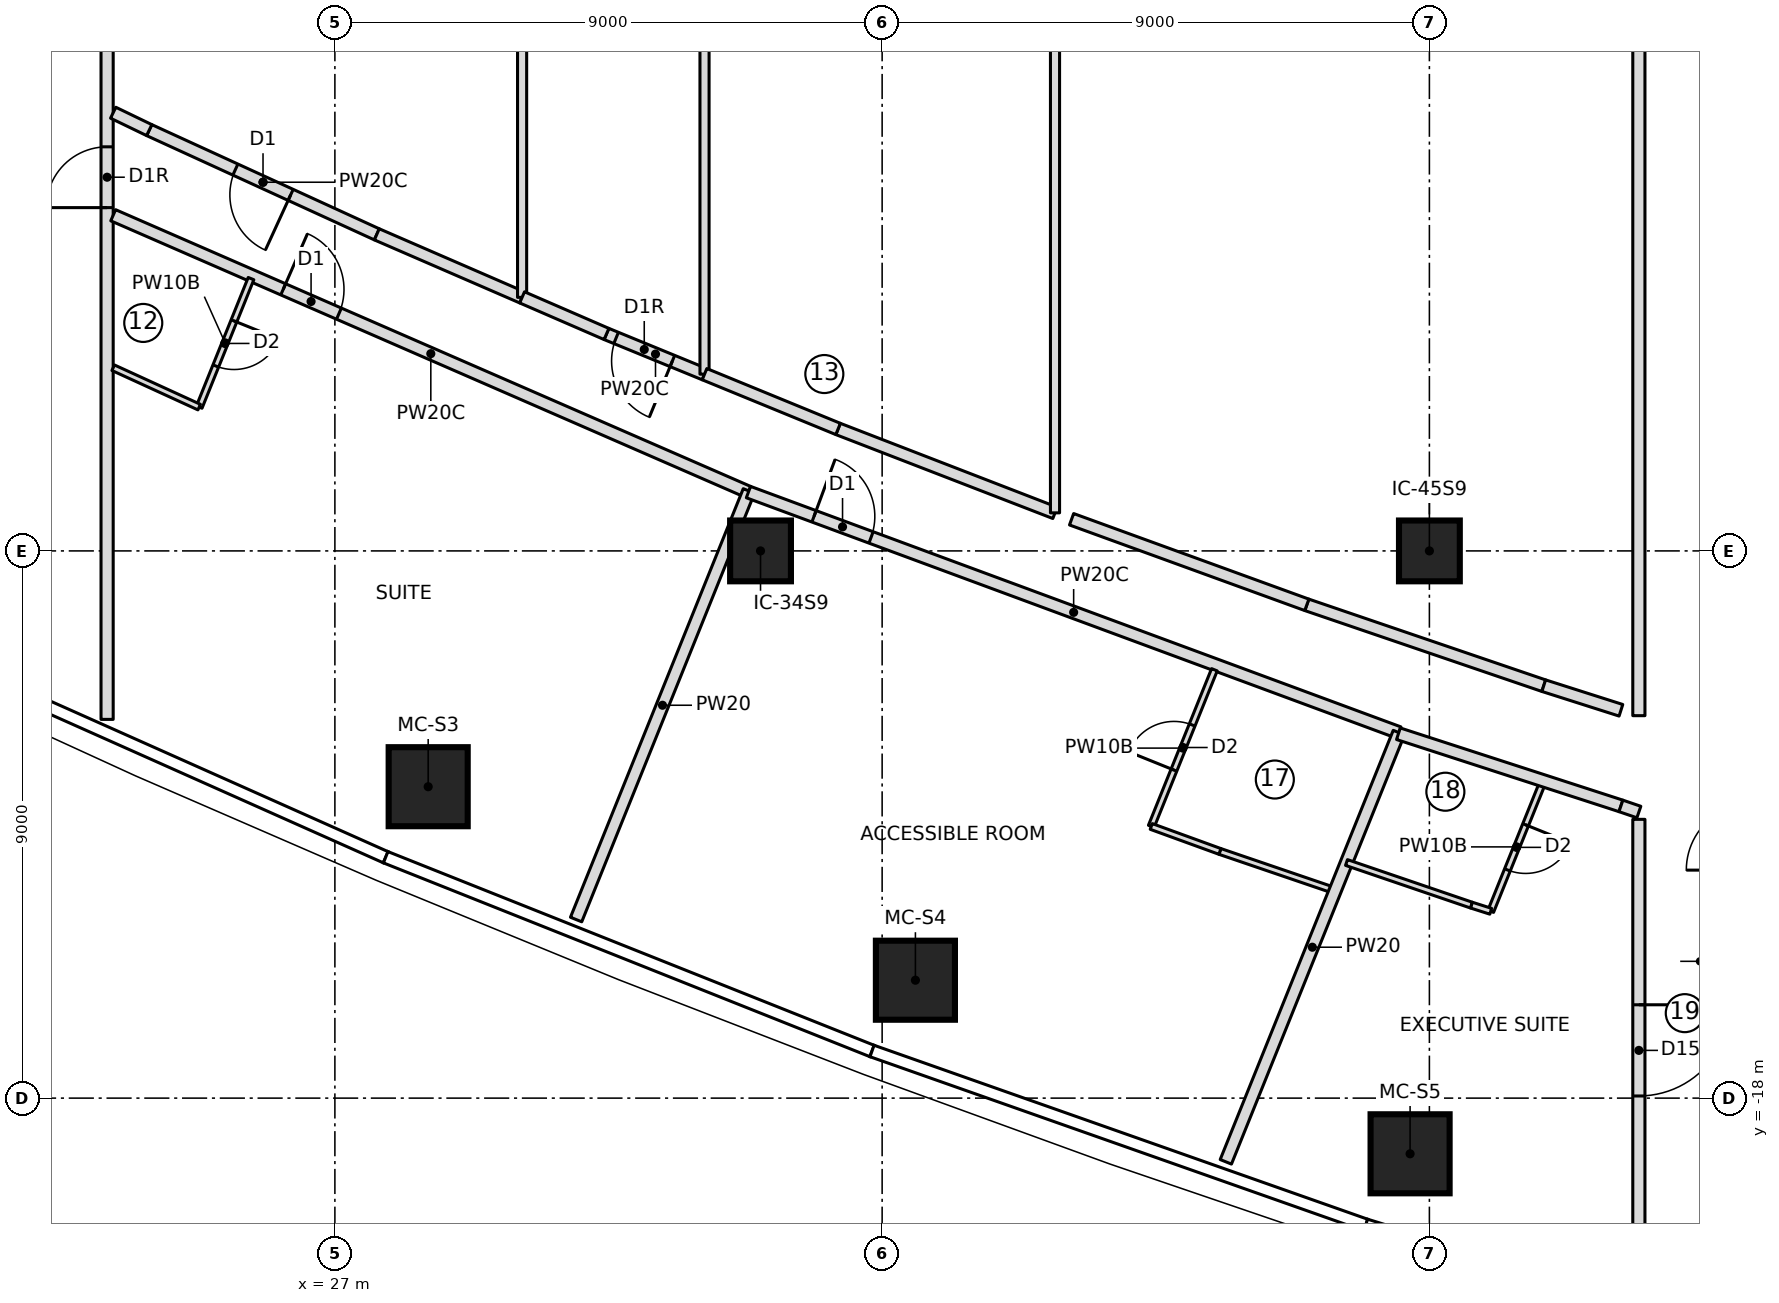
"""IFC4 building model, lengths in metres.
Left out: names, types, materials, properties, quantities, classifications, styles, units other than length and angle.
Written with IfcOpenShell. Run it as: python <this file> out.ifc"""

import sys

from ifc_helpers import new_model, si_unit, direction, frame, frame_2d, origin, origin_2d, place, context, subcontext, project, spatial, rectangle, extrude, element, fill, save


model = new_model("IFC4")
c1 = context("Model", 3, precision=1e-05, world=origin(), true_north=direction((0.0, 1.0)))
c2 = subcontext(c1, "Body", "Model", "MODEL_VIEW")
j1 = project(units=[si_unit("LENGTHUNIT", "METRE"), si_unit("PLANEANGLEUNIT", "RADIAN")], contexts=[c1])
p1 = place(None, origin())
s1 = spatial("IfcSite", under=j1, at=p1, CompositionType="ELEMENT")
p2 = place(p1, origin())
s2 = spatial("IfcBuilding", under=s1, at=p2, CompositionType="ELEMENT")
p3 = place(p2, frame((0.0, 0.0, 189.7)))
s3 = spatial("IfcBuildingStorey", under=s2, at=p3, CompositionType="ELEMENT", Elevation=189.7)
for number, where, z_axis, x_axis in (
    (1, (28.534, -12.878, 0.0), (0.0, 0.0, 1.0), (1.0, 0.0, 0.0)),
    (2, (36.547, -16.061, 0.0), (0.0, 0.0, 1.0), (1.0, 0.0, 0.0)),
    (3, (44.683, -18.916, 0.0), (0.0, 0.0, 1.0), (1.0, 0.0, 0.0)),
):
    element("IfcColumn", number, at=place(p3, frame(where, z_axis=z_axis, x_axis=x_axis)), inside=s3, PredefinedType="COLUMN", context=c2, shape_type="SweptSolid", body=[
        extrude(rectangle(XDim=1.3, YDim=1.3, at=origin_2d()), origin(), (0.0, 0.0, 1.0), 3.55),
    ])
for number, where, z_axis, x_axis in (
    (4, (34.0, -9.0, 0.0), (0.0, 0.0, 1.0), (1.0, 0.0, 0.0)),
    (5, (45.0, -9.0, 0.0), (0.0, 0.0, 1.0), (1.0, 0.0, 0.0)),
):
    element("IfcColumn", number, at=place(p3, frame(where, z_axis=z_axis, x_axis=x_axis)), inside=s3, PredefinedType="COLUMN", context=c2, shape_type="SweptSolid", body=[
        extrude(rectangle(XDim=1.0, YDim=1.0, at=origin_2d()), origin(), (0.0, 0.0, 1.0), 3.55),
    ])
p4 = place(p3, frame((23.254, -11.771, 0.0), z_axis=(0.0, 0.0, 1.0), x_axis=(0.0, 1.0, 0.0)))
e6 = element("IfcWall", 6, at=p4, inside=s3, PredefinedType="PARTITIONING", context=c2, shape_type="SweptSolid", body=[
    extrude(rectangle(XDim=23.542, YDim=0.2, at=frame_2d((11.771, 0.0))), origin(), (0.0, 0.0, 1.0), 3.25),
])
p5 = place(p4, frame((14.125, 0.0, 0.0)))
e7 = element("IfcOpeningElement", 7, at=p5, cuts=e6, PredefinedType="OPENING", context=c2, shape_type="SweptSolid", body=[
    extrude(rectangle(XDim=1.0, YDim=2.1, at=frame_2d((0.5, 1.05))), frame((0.0, 0.11, 0.0), z_axis=(0.0, -1.0, 0.0), x_axis=(1.0, 0.0, 0.0)), (0.0, 0.0, 1.0), 0.22),
])
p6 = place(p4, frame((8.417, 0.0, 0.0)))
e8 = element("IfcOpeningElement", 8, at=p6, cuts=e6, PredefinedType="OPENING", context=c2, shape_type="SweptSolid", body=[
    extrude(rectangle(XDim=1.0, YDim=2.1, at=frame_2d((0.5, 1.05))), frame((0.0, 0.11, 0.0), z_axis=(0.0, -1.0, 0.0), x_axis=(1.0, 0.0, 0.0)), (0.0, 0.0, 1.0), 0.22),
])
p7 = place(p3, frame((23.354, -3.479, 0.0), z_axis=(0.0, 0.0, 1.0), x_axis=(0.916726746983, -0.399514794926, 0.0)))
e9 = element("IfcWall", 9, at=p7, inside=s3, PredefinedType="PARTITIONING", context=c2, shape_type="SweptSolid", body=[
    extrude(rectangle(XDim=11.396, YDim=0.2, at=frame_2d((5.698, 0.0))), origin(), (0.0, 0.0, 1.0), 3.25),
])
p8 = place(p7, frame((3.05, 0.0, 0.0)))
e10 = element("IfcOpeningElement", 10, at=p8, cuts=e9, PredefinedType="OPENING", context=c2, shape_type="SweptSolid", body=[
    extrude(rectangle(XDim=1.0, YDim=2.1, at=frame_2d((0.5, 1.05))), frame((0.0, 0.11, 0.0), z_axis=(0.0, -1.0, 0.0), x_axis=(1.0, 0.0, 0.0)), (0.0, 0.0, 1.0), 0.22),
])
p9 = place(p3, frame((25.621, -4.521, 0.0), z_axis=(0.0, 0.0, 1.0), x_axis=(-0.373956446544, -0.927446265877, 0.0)))
e11 = element("IfcWall", 11, at=p9, inside=s3, PredefinedType="PARTITIONING", context=c2, shape_type="SweptSolid", body=[
    extrude(rectangle(XDim=2.279, YDim=0.1, at=frame_2d((1.14, 0.0))), origin(), (0.0, 0.0, 1.0), 3.25),
])
p10 = place(p9, frame((0.75, 0.0, 0.0)))
e12 = element("IfcOpeningElement", 12, at=p10, cuts=e11, PredefinedType="OPENING", context=c2, shape_type="SweptSolid", body=[
    extrude(rectangle(XDim=0.8, YDim=2.1, at=frame_2d((0.4, 1.05))), frame((0.0, 0.06, 0.0), z_axis=(0.0, -1.0, 0.0), x_axis=(1.0, 0.0, 0.0)), (0.0, 0.0, 1.0), 0.12),
])
p11 = place(p3, frame((24.769, -6.635, 0.0), z_axis=(0.0, 0.0, 1.0), x_axis=(-0.909158902999, 0.416449383597, 0.0)))
e13 = element("IfcWall", 13, at=p11, inside=s3, PredefinedType="PARTITIONING", context=c2, shape_type="SweptSolid", body=[
    extrude(rectangle(XDim=1.556, YDim=0.1, at=frame_2d((0.778, 0.0))), origin(), (0.0, 0.0, 1.0), 3.25),
])
p12 = place(p3, frame((30.967, -15.063, 0.0), z_axis=(0.0, 0.0, 1.0), x_axis=(0.373887223455, 0.927474174378, 0.0)))
e14 = element("IfcWall", 14, at=p12, inside=s3, PredefinedType="PARTITIONING", context=c2, shape_type="SweptSolid", body=[
    extrude(rectangle(XDim=7.6, YDim=0.2, at=frame_2d((3.8, 0.0))), origin(), (0.0, 0.0, 1.0), 3.25),
])
p13 = place(p3, frame((33.801, -8.032, 0.0), z_axis=(0.0, 0.0, 1.0), x_axis=(0.937916242759, -0.346861819127, 0.0)))
e15 = element("IfcWall", 15, at=p13, inside=s3, PredefinedType="PARTITIONING", context=c2, shape_type="SweptSolid", body=[
    extrude(rectangle(XDim=11.405, YDim=0.2, at=frame_2d((5.702, 0.0))), origin(), (0.0, 0.0, 1.0), 3.25),
])
p14 = place(p13, frame((1.15, 0.0, 0.0)))
e16 = element("IfcOpeningElement", 16, at=p14, cuts=e15, PredefinedType="OPENING", context=c2, shape_type="SweptSolid", body=[
    extrude(rectangle(XDim=1.0, YDim=2.1, at=frame_2d((0.5, 1.05))), frame((0.0, 0.11, 0.0), z_axis=(0.0, -1.0, 0.0), x_axis=(1.0, 0.0, 0.0)), (0.0, 0.0, 1.0), 0.22),
])
p15 = place(p3, frame((40.426, -13.532, 0.0), z_axis=(0.0, 0.0, 1.0), x_axis=(0.373889095325, 0.927473419779, 0.0)))
e17 = element("IfcWall", 17, at=p15, inside=s3, PredefinedType="PARTITIONING", context=c2, shape_type="SweptSolid", body=[
    extrude(rectangle(XDim=2.778, YDim=0.1, at=frame_2d((1.389, 0.0))), origin(), (0.0, 0.0, 1.0), 3.25),
])
p16 = place(p15, frame((1.0, 0.0, 0.0)))
e18 = element("IfcOpeningElement", 18, at=p16, cuts=e17, PredefinedType="OPENING", context=c2, shape_type="SweptSolid", body=[
    extrude(rectangle(XDim=0.8, YDim=2.1, at=frame_2d((0.4, 1.05))), frame((0.0, 0.06, 0.0), z_axis=(0.0, -1.0, 0.0), x_axis=(1.0, 0.0, 0.0)), (0.0, 0.0, 1.0), 0.12),
])
p17 = place(p3, frame((43.449, -14.589, 0.0), z_axis=(0.0, 0.0, 1.0), x_axis=(-0.94641533286, 0.322952036265, 0.0)))
e19 = element("IfcWall", 19, at=p17, inside=s3, PredefinedType="PARTITIONING", context=c2, shape_type="SweptSolid", body=[
    extrude(rectangle(XDim=2.002, YDim=0.1, at=frame_2d((1.001, 0.0))), origin(), (0.0, 0.0, 1.0), 3.25),
])
p18 = place(p3, frame((41.555, -13.943, 0.0), z_axis=(0.0, 0.0, 1.0), x_axis=(-0.939781557461, 0.341775692897, 0.0)))
e20 = element("IfcWall", 20, at=p18, inside=s3, PredefinedType="PARTITIONING", context=c2, shape_type="SweptSolid", body=[
    extrude(rectangle(XDim=1.201, YDim=0.1, at=frame_2d((0.601, 0.0))), origin(), (0.0, 0.0, 1.0), 3.25),
])
p19 = place(p3, frame((41.652, -19.048, 0.0), z_axis=(0.0, 0.0, 1.0), x_axis=(0.373877998371, 0.927477893178, 0.0)))
e21 = element("IfcWall", 21, at=p19, inside=s3, PredefinedType="PARTITIONING", context=c2, shape_type="SweptSolid", body=[
    extrude(rectangle(XDim=7.611, YDim=0.2, at=frame_2d((3.806, 0.0))), origin(), (0.0, 0.0, 1.0), 3.25),
])
p20 = place(p3, frame((46.863, -12.809, 0.0), z_axis=(0.0, 0.0, 1.0), x_axis=(-0.373877855241, -0.927477950876, 0.0)))
e22 = element("IfcWall", 22, at=p20, inside=s3, PredefinedType="PARTITIONING", context=c2, shape_type="SweptSolid", body=[
    extrude(rectangle(XDim=2.283, YDim=0.1, at=frame_2d((1.142, 0.0))), origin(), (0.0, 0.0, 1.0), 3.25),
])
p21 = place(p20, frame((0.75, 0.0, 0.0)))
e23 = element("IfcOpeningElement", 23, at=p21, cuts=e22, PredefinedType="OPENING", context=c2, shape_type="SweptSolid", body=[
    extrude(rectangle(XDim=0.8, YDim=2.1, at=frame_2d((0.4, 1.05))), frame((0.0, 0.06, 0.0), z_axis=(0.0, -1.0, 0.0), x_axis=(1.0, 0.0, 0.0)), (0.0, 0.0, 1.0), 0.12),
])
p22 = place(p3, frame((46.009, -14.927, 0.0), z_axis=(0.0, 0.0, 1.0), x_axis=(-0.952618746207, 0.304166935045, 0.0)))
e24 = element("IfcWall", 24, at=p22, inside=s3, PredefinedType="PARTITIONING", context=c2, shape_type="SweptSolid", body=[
    extrude(rectangle(XDim=0.335, YDim=0.1, at=frame_2d((0.167, 0.0))), origin(), (0.0, 0.0, 1.0), 3.25),
])
p23 = place(p3, frame((45.69, -14.825, 0.0), z_axis=(0.0, 0.0, 1.0), x_axis=(-0.946442988685, 0.322870979136, 0.0)))
e25 = element("IfcWall", 25, at=p23, inside=s3, PredefinedType="PARTITIONING", context=c2, shape_type="SweptSolid", body=[
    extrude(rectangle(XDim=2.169, YDim=0.1, at=frame_2d((1.085, 0.0))), origin(), (0.0, 0.0, 1.0), 3.25),
])
p24 = place(p3, frame((27.69, -3.793, 0.0), z_axis=(0.0, 0.0, 1.0), x_axis=(-0.909180834404, 0.416401501382, 0.0)))
e26 = element("IfcWall", 26, at=p24, inside=s3, PredefinedType="PARTITIONING", context=c2, shape_type="SweptSolid", body=[
    extrude(rectangle(XDim=4.117, YDim=0.2, at=frame_2d((2.059, 0.0))), origin(), (0.0, 0.0, 1.0), 3.25),
])
p25 = place(p24, frame((1.559, 0.0, 0.0)))
e27 = element("IfcOpeningElement", 27, at=p25, cuts=e26, PredefinedType="OPENING", context=c2, shape_type="SweptSolid", body=[
    extrude(rectangle(XDim=1.0, YDim=2.1, at=frame_2d((0.5, 1.05))), frame((0.0, 0.11, 0.0), z_axis=(0.0, -1.0, 0.0), x_axis=(1.0, 0.0, 0.0)), (0.0, 0.0, 1.0), 0.22),
])
p26 = place(p3, frame((23.947, -2.079, 0.0), z_axis=(0.0, 0.0, 1.0), x_axis=(-0.900646803965, 0.434551877809, 0.0)))
e28 = element("IfcWall", 28, at=p26, inside=s3, PredefinedType="PARTITIONING", context=c2, shape_type="SweptSolid", body=[
    extrude(rectangle(XDim=0.658, YDim=0.2, at=frame_2d((0.329, 0.0))), origin(), (0.0, 0.0, 1.0), 3.25),
])
p27 = place(p3, frame((30.079, -4.83, 0.0), z_axis=(0.0, 0.0, 1.0), x_axis=(-0.917370846112, 0.398033579869, 0.0)))
e29 = element("IfcWall", 29, at=p27, inside=s3, PredefinedType="PARTITIONING", context=c2, shape_type="SweptSolid", body=[
    extrude(rectangle(XDim=2.604, YDim=0.2, at=frame_2d((1.302, 0.0))), origin(), (0.0, 0.0, 1.0), 3.25),
])
p28 = place(p3, frame((30.079, -4.83, 0.0), z_axis=(0.0, 0.0, 1.0), x_axis=(0.0, 1.0, 0.0)))
e30 = element("IfcWall", 30, at=p28, inside=s3, PredefinedType="PARTITIONING", context=c2, shape_type="SweptSolid", body=[
    extrude(rectangle(XDim=9.66, YDim=0.15, at=frame_2d((4.83, 0.0))), origin(), (0.0, 0.0, 1.0), 3.25),
])
p29 = place(p3, frame((33.079, -6.093, 0.0), z_axis=(0.0, 0.0, 1.0), x_axis=(-0.925234201035, 0.379396459177, 0.0)))
e31 = element("IfcWall", 31, at=p29, inside=s3, PredefinedType="PARTITIONING", context=c2, shape_type="SweptSolid", body=[
    extrude(rectangle(XDim=1.743, YDim=0.2, at=frame_2d((0.871, 0.0))), origin(), (0.0, 0.0, 1.0), 3.25),
])
p30 = place(p29, frame((0.571, 0.0, 0.0)))
e32 = element("IfcOpeningElement", 32, at=p30, cuts=e31, PredefinedType="OPENING", context=c2, shape_type="SweptSolid", body=[
    extrude(rectangle(XDim=1.0, YDim=2.1, at=frame_2d((0.5, 1.05))), frame((0.0, 0.11, 0.0), z_axis=(0.0, -1.0, 0.0), x_axis=(1.0, 0.0, 0.0)), (0.0, 0.0, 1.0), 0.22),
])
p31 = place(p3, frame((31.467, -5.432, 0.0), z_axis=(0.0, 0.0, 1.0), x_axis=(-0.917382817853, 0.398005986774, 0.0)))
e33 = element("IfcWall", 33, at=p31, inside=s3, PredefinedType="PARTITIONING", context=c2, shape_type="SweptSolid", body=[
    extrude(rectangle(XDim=1.513, YDim=0.2, at=frame_2d((0.756, 0.0))), origin(), (0.0, 0.0, 1.0), 3.25),
])
p32 = place(p3, frame((33.079, -6.093, 0.0), z_axis=(0.0, 0.0, 1.0), x_axis=(0.0, 1.0, 0.0)))
e34 = element("IfcWall", 34, at=p32, inside=s3, PredefinedType="PARTITIONING", context=c2, shape_type="SweptSolid", body=[
    extrude(rectangle(XDim=12.187, YDim=0.15, at=frame_2d((6.093, 0.0))), origin(), (0.0, 0.0, 1.0), 3.25),
])
p33 = place(p3, frame((38.843, -8.374, 0.0), z_axis=(0.0, 0.0, 1.0), x_axis=(-0.932681040007, 0.360702200731, 0.0)))
e35 = element("IfcWall", 35, at=p33, inside=s3, PredefinedType="PARTITIONING", context=c2, shape_type="SweptSolid", body=[
    extrude(rectangle(XDim=3.825, YDim=0.2, at=frame_2d((1.913, 0.0))), origin(), (0.0, 0.0, 1.0), 3.25),
])
p34 = place(p3, frame((35.276, -6.994, 0.0), z_axis=(0.0, 0.0, 1.0), x_axis=(-0.925186207522, 0.37951347988, 0.0)))
e36 = element("IfcWall", 36, at=p34, inside=s3, PredefinedType="PARTITIONING", context=c2, shape_type="SweptSolid", body=[
    extrude(rectangle(XDim=2.375, YDim=0.2, at=frame_2d((1.187, 0.0))), origin(), (0.0, 0.0, 1.0), 3.25),
])
p35 = place(p3, frame((38.843, -8.374, 0.0), z_axis=(0.0, 0.0, 1.0), x_axis=(0.0, 1.0, 0.0)))
e37 = element("IfcWall", 37, at=p35, inside=s3, PredefinedType="PARTITIONING", context=c2, shape_type="SweptSolid", body=[
    extrude(rectangle(XDim=16.748, YDim=0.15, at=frame_2d((8.374, 0.0))), origin(), (0.0, 0.0, 1.0), 3.25),
])
for number, where, z_axis, x_axis in (
    (38, (46.881, -11.217, 0.0), (0.0, 0.0, 1.0), (-0.946, 0.323, 0.0)),
    (39, (42.984, -9.887, 0.0), (0.0, 0.0, 1.0), (-0.94, 0.342, 0.0)),
):
    element("IfcWall", number, at=place(p3, frame(where, z_axis=z_axis, x_axis=x_axis)), inside=s3, PredefinedType="PARTITIONING", context=c2, shape_type="SweptSolid", body=[
        extrude(rectangle(XDim=4.117, YDim=0.2, at=frame_2d((2.059, 0.0))), origin(), (0.0, 0.0, 1.0), 3.25),
    ])
p36 = place(p3, frame((44.49, -12.007, 0.0), z_axis=(0.0, 0.0, 1.0), x_axis=(0.951228355446, -0.308487626648, 0.0)))
e40 = element("IfcWall", 40, at=p36, inside=s3, PredefinedType="PARTITIONING", context=c2, shape_type="SweptSolid", body=[
    extrude(rectangle(XDim=3.847, YDim=0.2, at=frame_2d((1.924, 0.0))), origin(), (0.0, 0.0, 1.0), 3.25),
])
p37 = place(p3, frame((48.15, -11.621, 0.0), z_axis=(0.0, 0.0, 1.0), x_axis=(-0.952761948983, 0.303718074157, 0.0)))
e41 = element("IfcWall", 41, at=p37, inside=s3, PredefinedType="PARTITIONING", context=c2, shape_type="SweptSolid", body=[
    extrude(rectangle(XDim=1.332, YDim=0.2, at=frame_2d((0.666, 0.0))), origin(), (0.0, 0.0, 1.0), 3.25),
])
p38 = place(p3, frame((48.445, 11.71, 0.0), z_axis=(0.0, 0.0, 1.0), x_axis=(0.0, -1.0, 0.0)))
e42 = element("IfcWall", 42, at=p38, inside=s3, PredefinedType="PARTITIONING", context=c2, shape_type="SweptSolid", body=[
    extrude(rectangle(XDim=23.42, YDim=0.2, at=frame_2d((11.71, 0.0))), origin(), (0.0, 0.0, 1.0), 3.25),
])
p39 = place(p3, frame((48.15, -13.194, 0.0), z_axis=(0.0, 0.0, 1.0), x_axis=(0.946069343286, -0.323964191994, 0.0)))
e43 = element("IfcWall", 43, at=p39, inside=s3, PredefinedType="PARTITIONING", context=c2, shape_type="SweptSolid", body=[
    extrude(rectangle(XDim=0.312, YDim=0.2, at=frame_2d((0.156, 0.0))), origin(), (0.0, 0.0, 1.0), 3.25),
])
p40 = place(p3, frame((48.445, -13.415, 0.0), z_axis=(0.0, 0.0, 1.0), x_axis=(0.0, -1.0, 0.0)))
e44 = element("IfcWall", 44, at=p40, inside=s3, PredefinedType="PARTITIONING", context=c2, shape_type="SweptSolid", body=[
    extrude(rectangle(XDim=6.936, YDim=0.2, at=frame_2d((3.468, 0.0))), origin(), (0.0, 0.0, 1.0), 3.25),
])
p41 = place(p40, frame((3.05, 0.0, 0.0)))
e45 = element("IfcOpeningElement", 45, at=p41, cuts=e44, PredefinedType="OPENING", context=c2, shape_type="SweptSolid", body=[
    extrude(rectangle(XDim=1.5, YDim=2.1, at=frame_2d((0.75, 1.05))), frame((0.0, 0.11, 0.0), z_axis=(0.0, -1.0, 0.0), x_axis=(1.0, 0.0, 0.0)), (0.0, 0.0, 1.0), 0.22),
])
p42 = place(p6, origin())
e46 = element("IfcDoor", 46, at=p42, inside=s3, OperationType="SINGLE_SWING_RIGHT", PredefinedType="DOOR", context=c2, shape_type="SweptSolid", body=[
    extrude(rectangle(XDim=1.0, YDim=2.1, at=frame_2d((0.5, 1.05))), frame((0.0, 0.025, 0.0), z_axis=(0.0, -1.0, 0.0), x_axis=(1.0, 0.0, 0.0)), (0.0, 0.0, 1.0), 0.05),
])
fill(e8, e46)
p43 = place(p10, origin())
e47 = element("IfcDoor", 47, at=p43, inside=s3, OperationType="SINGLE_SWING_LEFT", PredefinedType="DOOR", context=c2, shape_type="SweptSolid", body=[
    extrude(rectangle(XDim=0.8, YDim=2.1, at=frame_2d((0.4, 1.05))), frame((0.0, 0.025, 0.0), z_axis=(0.0, -1.0, 0.0), x_axis=(1.0, 0.0, 0.0)), (0.0, 0.0, 1.0), 0.05),
])
fill(e12, e47)
p44 = place(p8, origin())
e48 = element("IfcDoor", 48, at=p44, inside=s3, OperationType="SINGLE_SWING_LEFT", PredefinedType="DOOR", context=c2, shape_type="SweptSolid", body=[
    extrude(rectangle(XDim=1.0, YDim=2.1, at=frame_2d((0.5, 1.05))), frame((0.0, 0.025, 0.0), z_axis=(0.0, -1.0, 0.0), x_axis=(1.0, 0.0, 0.0)), (0.0, 0.0, 1.0), 0.05),
])
fill(e10, e48)
p45 = place(p16, origin())
e49 = element("IfcDoor", 49, at=p45, inside=s3, OperationType="SINGLE_SWING_LEFT", PredefinedType="DOOR", context=c2, shape_type="SweptSolid", body=[
    extrude(rectangle(XDim=0.8, YDim=2.1, at=frame_2d((0.4, 1.05))), frame((0.0, 0.025, 0.0), z_axis=(0.0, -1.0, 0.0), x_axis=(1.0, 0.0, 0.0)), (0.0, 0.0, 1.0), 0.05),
])
fill(e18, e49)
p46 = place(p14, origin())
e50 = element("IfcDoor", 50, at=p46, inside=s3, OperationType="SINGLE_SWING_LEFT", PredefinedType="DOOR", context=c2, shape_type="SweptSolid", body=[
    extrude(rectangle(XDim=1.0, YDim=2.1, at=frame_2d((0.5, 1.05))), frame((0.0, 0.025, 0.0), z_axis=(0.0, -1.0, 0.0), x_axis=(1.0, 0.0, 0.0)), (0.0, 0.0, 1.0), 0.05),
])
fill(e16, e50)
p47 = place(p21, origin())
e51 = element("IfcDoor", 51, at=p47, inside=s3, OperationType="SINGLE_SWING_LEFT", PredefinedType="DOOR", context=c2, shape_type="SweptSolid", body=[
    extrude(rectangle(XDim=0.8, YDim=2.1, at=frame_2d((0.4, 1.05))), frame((0.0, 0.025, 0.0), z_axis=(0.0, -1.0, 0.0), x_axis=(1.0, 0.0, 0.0)), (0.0, 0.0, 1.0), 0.05),
])
fill(e23, e51)
p48 = place(p25, origin())
e52 = element("IfcDoor", 52, at=p48, inside=s3, OperationType="SINGLE_SWING_LEFT", PredefinedType="DOOR", context=c2, shape_type="SweptSolid", body=[
    extrude(rectangle(XDim=1.0, YDim=2.1, at=frame_2d((0.5, 1.05))), frame((0.0, 0.025, 0.0), z_axis=(0.0, -1.0, 0.0), x_axis=(1.0, 0.0, 0.0)), (0.0, 0.0, 1.0), 0.05),
])
fill(e27, e52)
p49 = place(p30, origin())
e53 = element("IfcDoor", 53, at=p49, inside=s3, OperationType="SINGLE_SWING_RIGHT", PredefinedType="DOOR", context=c2, shape_type="SweptSolid", body=[
    extrude(rectangle(XDim=1.0, YDim=2.1, at=frame_2d((0.5, 1.05))), frame((0.0, 0.025, 0.0), z_axis=(0.0, -1.0, 0.0), x_axis=(1.0, 0.0, 0.0)), (0.0, 0.0, 1.0), 0.05),
])
fill(e32, e53)
p50 = place(p41, origin())
e54 = element("IfcDoor", 54, at=p50, inside=s3, OperationType="DOUBLE_DOOR_SINGLE_SWING", PredefinedType="DOOR", context=c2, shape_type="SweptSolid", body=[
    extrude(rectangle(XDim=1.5, YDim=2.1, at=frame_2d((0.75, 1.05))), frame((0.0, 0.025, 0.0), z_axis=(0.0, -1.0, 0.0), x_axis=(1.0, 0.0, 0.0)), (0.0, 0.0, 1.0), 0.05),
])
fill(e45, e54)
save(model, sys.argv[1])
